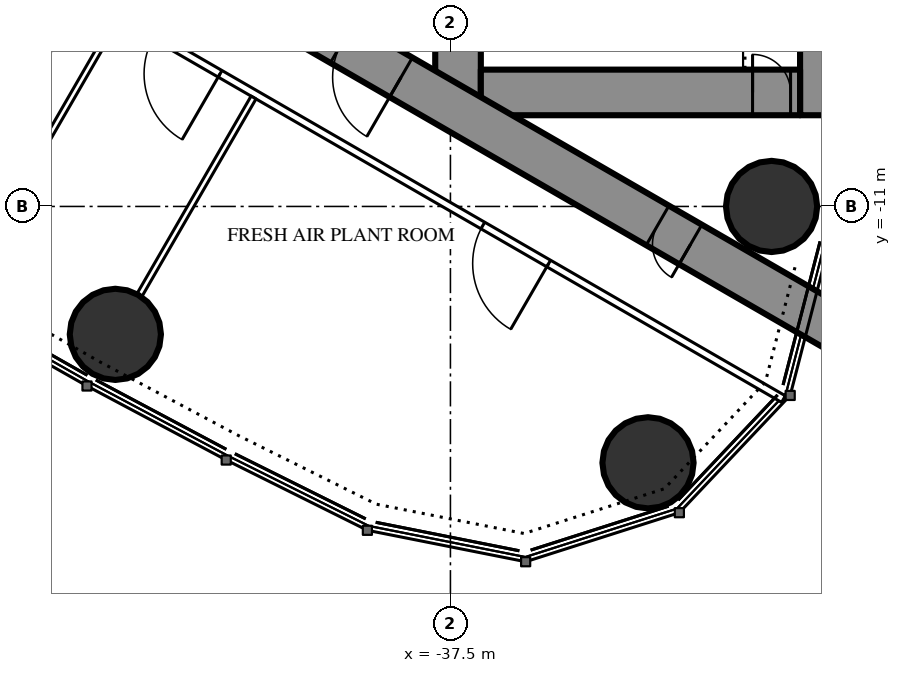
"""IFC4 building model, lengths in metres.
Left out: names, types, materials, properties, quantities, classifications, styles, units other than length and angle.
Written with IfcOpenShell. Run it as: python <this file> out.ifc"""

import sys

from ifc_helpers import new_model, si_unit, direction, frame, frame_2d, origin, origin_2d, place, context, subcontext, project, spatial, rectangle, circle, extrude, element, fill, save


model = new_model("IFC4")
c1 = context("Model", 3, precision=1e-05, world=origin(), true_north=direction((0.0, 1.0)))
c2 = subcontext(c1, "Body", "Model", "MODEL_VIEW")
j1 = project(units=[si_unit("LENGTHUNIT", "METRE"), si_unit("PLANEANGLEUNIT", "RADIAN")], contexts=[c1])
p1 = place(None, origin())
s1 = spatial("IfcSite", under=j1, at=p1, CompositionType="ELEMENT")
p2 = place(p1, origin())
s2 = spatial("IfcBuilding", under=s1, at=p2, CompositionType="ELEMENT")
p3 = place(p2, frame((0.0, 0.0, 268.3)))
s3 = spatial("IfcBuildingStorey", under=s2, at=p3, CompositionType="ELEMENT", Elevation=268.3)
for number, where, z_axis, x_axis in (
    (1, (-32.301, -17.745, 0.0), (0.0, 0.0, 1.0), (1.0, 0.0, 0.0)),
    (2, (-29.05, -11.0, 0.0), (0.0, 0.0, 1.0), (1.0, 0.0, 0.0)),
    (3, (-46.317, -14.365, 0.0), (0.0, 0.0, 1.0), (1.0, 0.0, 0.0)),
):
    element("IfcColumn", number, at=place(p3, frame(where, z_axis=z_axis, x_axis=x_axis)), inside=s3, PredefinedType="COLUMN", context=c2, shape_type="SweptSolid", body=[
        extrude(circle(Radius=1.2, at=origin_2d()), origin(), (0.0, 0.0, 1.0), 5.0),
    ])
p4 = place(p3, frame((-27.9, 8.6, 0.0), z_axis=(0.0, 0.0, 1.0), x_axis=(0.0, -1.0, 0.0)))
e4 = element("IfcWall", 4, at=p4, inside=s3, PredefinedType="SHEAR", context=c2, shape_type="SweptSolid", body=[
    extrude(rectangle(XDim=17.2, YDim=0.8, at=frame_2d((8.6, 0.0))), origin(), (0.0, 0.0, 1.0), 5.0),
])
p5 = place(p4, frame((6.95, 0.0, 0.0)))
e5 = element("IfcOpeningElement", 5, at=p5, cuts=e4, PredefinedType="OPENING", context=c2, shape_type="SweptSolid", body=[
    extrude(rectangle(XDim=0.9, YDim=2.2, at=frame_2d((0.45, 1.1))), frame((0.0, 0.41, 0.0), z_axis=(0.0, -1.0, 0.0), x_axis=(1.0, 0.0, 0.0)), (0.0, 0.0, 1.0), 0.82),
])
p6 = place(p3, frame((-37.3, 8.6, 0.0), z_axis=(0.0, 0.0, 1.0), x_axis=(0.0, -1.0, 0.0)))
e6 = element("IfcWall", 6, at=p6, inside=s3, PredefinedType="SHEAR", context=c2, shape_type="SweptSolid", body=[
    extrude(rectangle(XDim=17.2, YDim=1.2, at=frame_2d((8.6, 0.0))), origin(), (0.0, 0.0, 1.0), 5.0),
])
p7 = place(p6, frame((7.7, 0.0, 0.0)))
e7 = element("IfcOpeningElement", 7, at=p7, cuts=e6, PredefinedType="OPENING", context=c2, shape_type="SweptSolid", body=[
    extrude(rectangle(XDim=1.8, YDim=2.2, at=frame_2d((0.9, 1.1))), frame((0.0, 0.61, 0.0), z_axis=(0.0, -1.0, 0.0), x_axis=(1.0, 0.0, 0.0)), (0.0, 0.0, 1.0), 1.22),
])
p8 = place(p3, frame((-28.3, -8.0, 0.0), z_axis=(0.0, 0.0, 1.0), x_axis=(-1.0, 0.0, 0.0)))
e8 = element("IfcWall", 8, at=p8, inside=s3, PredefinedType="SHEAR", context=c2, shape_type="SweptSolid", body=[
    extrude(rectangle(XDim=8.4, YDim=1.2, at=frame_2d((4.2, 0.0))), origin(), (0.0, 0.0, 1.0), 5.0),
])
p9 = place(p8, frame((0.25, 0.0, 0.0)))
e9 = element("IfcOpeningElement", 9, at=p9, cuts=e8, PredefinedType="OPENING", context=c2, shape_type="SweptSolid", body=[
    extrude(rectangle(XDim=1.0, YDim=2.2, at=frame_2d((0.5, 1.1))), frame((0.0, 0.61, 0.0), z_axis=(0.0, -1.0, 0.0), x_axis=(1.0, 0.0, 0.0)), (0.0, 0.0, 1.0), 1.22),
])
p10 = place(p3, frame((-27.2, -14.3, 0.0), z_axis=(0.0, 0.0, 1.0), x_axis=(-0.866024021859, 0.500002393557, 0.0)))
e10 = element("IfcWall", 10, at=p10, inside=s3, PredefinedType="SHEAR", context=c2, shape_type="SweptSolid", body=[
    extrude(rectangle(XDim=27.907, YDim=1.2, at=frame_2d((13.954, 0.0))), origin(), (0.0, 0.0, 1.0), 5.0),
])
p11 = place(p10, frame((4.6, 0.0, 0.0)))
e11 = element("IfcOpeningElement", 11, at=p11, cuts=e10, PredefinedType="OPENING", context=c2, shape_type="SweptSolid", body=[
    extrude(rectangle(XDim=1.0, YDim=2.2, at=frame_2d((0.5, 1.1))), frame((0.0, 0.61, 0.0), z_axis=(0.0, -1.0, 0.0), x_axis=(1.0, 0.0, 0.0)), (0.0, 0.0, 1.0), 1.22),
])
p12 = place(p10, frame((13.395, 0.0, 0.0)))
e12 = element("IfcOpeningElement", 12, at=p12, cuts=e10, PredefinedType="OPENING", context=c2, shape_type="SweptSolid", body=[
    extrude(rectangle(XDim=1.8, YDim=2.2, at=frame_2d((0.9, 1.1))), frame((0.0, 0.61, 0.0), z_axis=(0.0, -1.0, 0.0), x_axis=(1.0, 0.0, 0.0)), (0.0, 0.0, 1.0), 1.22),
])
p13 = place(p3, frame((-28.737, -16.068, 0.0), z_axis=(0.0, 0.0, 1.0), x_axis=(-0.866026220747, 0.499998584977, 0.0)))
e13 = element("IfcWall", 13, at=p13, inside=s3, PredefinedType="PARTITIONING", context=c2, shape_type="SweptSolid", body=[
    extrude(rectangle(XDim=32.017, YDim=0.2, at=frame_2d((16.008, 0.0))), origin(), (0.0, 0.0, 1.0), 4.7),
])
p14 = place(p13, frame((27.066, 0.0, 0.0)))
e14 = element("IfcOpeningElement", 14, at=p14, cuts=e13, PredefinedType="OPENING", context=c2, shape_type="SweptSolid", body=[
    extrude(rectangle(XDim=2.0, YDim=2.4, at=frame_2d((1.0, 1.2))), frame((0.0, 0.11, 0.0), z_axis=(0.0, -1.0, 0.0), x_axis=(1.0, 0.0, 0.0)), (0.0, 0.0, 1.0), 0.22),
])
p15 = place(p13, frame((21.266, 0.0, 0.0)))
e15 = element("IfcOpeningElement", 15, at=p15, cuts=e13, PredefinedType="OPENING", context=c2, shape_type="SweptSolid", body=[
    extrude(rectangle(XDim=2.0, YDim=2.4, at=frame_2d((1.0, 1.2))), frame((0.0, 0.11, 0.0), z_axis=(0.0, -1.0, 0.0), x_axis=(1.0, 0.0, 0.0)), (0.0, 0.0, 1.0), 0.22),
])
p16 = place(p13, frame((17.117, 0.0, 0.0)))
e16 = element("IfcOpeningElement", 16, at=p16, cuts=e13, PredefinedType="OPENING", context=c2, shape_type="SweptSolid", body=[
    extrude(rectangle(XDim=2.0, YDim=2.4, at=frame_2d((1.0, 1.2))), frame((0.0, 0.11, 0.0), z_axis=(0.0, -1.0, 0.0), x_axis=(1.0, 0.0, 0.0)), (0.0, 0.0, 1.0), 0.22),
])
p17 = place(p13, frame((7.134, 0.0, 0.0)))
e17 = element("IfcOpeningElement", 17, at=p17, cuts=e13, PredefinedType="OPENING", context=c2, shape_type="SweptSolid", body=[
    extrude(rectangle(XDim=2.0, YDim=2.4, at=frame_2d((1.0, 1.2))), frame((0.0, 0.11, 0.0), z_axis=(0.0, -1.0, 0.0), x_axis=(1.0, 0.0, 0.0)), (0.0, 0.0, 1.0), 0.22),
])
p18 = place(p3, frame((-42.68, -8.134, 0.0), z_axis=(0.0, 0.0, 1.0), x_axis=(-0.499984479505, -0.866034364361, 0.0)))
e18 = element("IfcWall", 18, at=p18, inside=s3, PredefinedType="PARTITIONING", context=c2, shape_type="SweptSolid", body=[
    extrude(rectangle(XDim=5.995, YDim=0.15, at=frame_2d((2.998, 0.0))), origin(), (0.0, 0.0, 1.0), 3.8),
])
p19 = place(p3, frame((-46.274, -6.059, 0.0), z_axis=(0.0, 0.0, 1.0), x_axis=(-0.500020471368, -0.866013584312, 0.0)))
e19 = element("IfcWall", 19, at=p19, inside=s3, PredefinedType="PARTITIONING", context=c2, shape_type="SweptSolid", body=[
    extrude(rectangle(XDim=6.028, YDim=0.15, at=frame_2d((3.014, 0.0))), origin(), (0.0, 0.0, 1.0), 3.8),
])
p20 = place(p16, origin())
e20 = element("IfcDoor", 20, at=p20, inside=s3, OperationType="DOUBLE_DOOR_SINGLE_SWING", PredefinedType="DOOR", context=c2, shape_type="SweptSolid", body=[
    extrude(rectangle(XDim=2.0, YDim=2.4, at=frame_2d((1.0, 1.2))), frame((0.0, 0.025, 0.0), z_axis=(0.0, -1.0, 0.0), x_axis=(1.0, 0.0, 0.0)), (0.0, 0.0, 1.0), 0.05),
])
fill(e16, e20)
p21 = place(p17, origin())
e21 = element("IfcDoor", 21, at=p21, inside=s3, OperationType="DOUBLE_DOOR_SINGLE_SWING", PredefinedType="DOOR", context=c2, shape_type="SweptSolid", body=[
    extrude(rectangle(XDim=2.0, YDim=2.4, at=frame_2d((1.0, 1.2))), frame((0.0, 0.025, 0.0), z_axis=(0.0, -1.0, 0.0), x_axis=(1.0, 0.0, 0.0)), (0.0, 0.0, 1.0), 0.05),
])
fill(e17, e21)
p22 = place(p11, origin())
e22 = element("IfcDoor", 22, at=p22, inside=s3, OperationType="SINGLE_SWING_LEFT", PredefinedType="DOOR", context=c2, shape_type="SweptSolid", body=[
    extrude(rectangle(XDim=1.0, YDim=2.2, at=frame_2d((0.5, 1.1))), frame((0.0, 0.025, 0.0), z_axis=(0.0, -1.0, 0.0), x_axis=(1.0, 0.0, 0.0)), (0.0, 0.0, 1.0), 0.05),
])
fill(e11, e22)
p23 = place(p12, origin())
e23 = element("IfcDoor", 23, at=p23, inside=s3, OperationType="DOUBLE_DOOR_SINGLE_SWING", PredefinedType="DOOR", context=c2, shape_type="SweptSolid", body=[
    extrude(rectangle(XDim=1.8, YDim=2.2, at=frame_2d((0.9, 1.1))), frame((0.0, 0.025, 0.0), z_axis=(0.0, -1.0, 0.0), x_axis=(1.0, 0.0, 0.0)), (0.0, 0.0, 1.0), 0.05),
])
fill(e12, e23)
p24 = place(p9, origin())
e24 = element("IfcDoor", 24, at=p24, inside=s3, OperationType="SINGLE_SWING_RIGHT", PredefinedType="DOOR", context=c2, shape_type="SweptSolid", body=[
    extrude(rectangle(XDim=1.0, YDim=2.2, at=frame_2d((0.5, 1.1))), frame((0.0, 0.025, 0.0), z_axis=(0.0, -1.0, 0.0), x_axis=(1.0, 0.0, 0.0)), (0.0, 0.0, 1.0), 0.05),
])
fill(e9, e24)
save(model, sys.argv[1])
